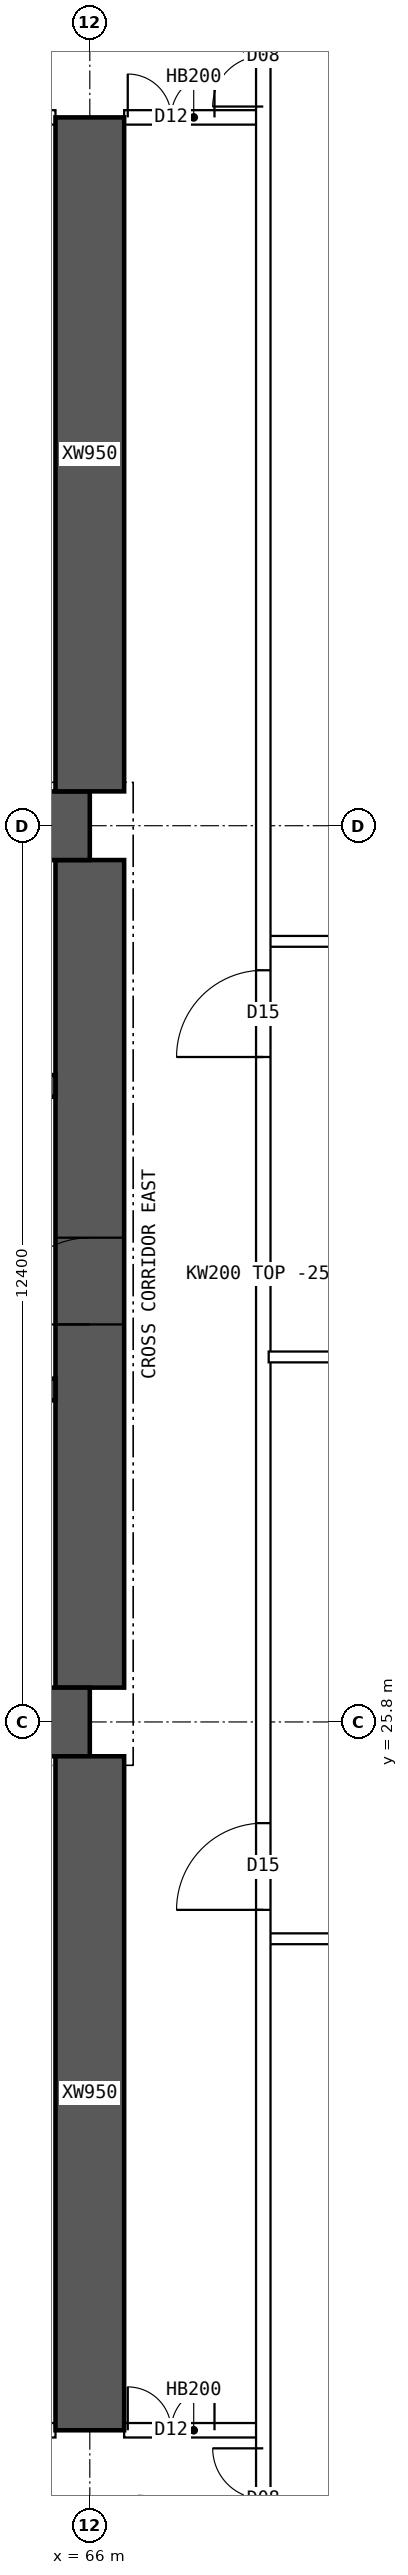
"""IFC4 building model, lengths in metres.
Left out: names, types, materials, properties, quantities, classifications, styles, units other than length and angle.
Written with IfcOpenShell. Run it as: python <this file> out.ifc"""

import sys

from ifc_helpers import new_model, si_unit, direction, frame, frame_2d, origin, place, context, subcontext, project, spatial, polyline, rectangle, outline, extrude, element, fill, save


model = new_model("IFC4")
c1 = context("Model", 3, precision=1e-05, world=origin(), true_north=direction((0.0, 1.0)))
c2 = subcontext(c1, "Body", "Model", "MODEL_VIEW")
j1 = project(units=[si_unit("LENGTHUNIT", "METRE"), si_unit("PLANEANGLEUNIT", "RADIAN")], contexts=[c1])
p1 = place(None, origin())
s1 = spatial("IfcSite", under=j1, at=p1, CompositionType="ELEMENT")
p2 = place(p1, origin())
s2 = spatial("IfcBuilding", under=s1, at=p2, CompositionType="ELEMENT")
p3 = place(p2, frame((0.0, 0.0, 76.15)))
s3 = spatial("IfcBuildingStorey", under=s2, at=p3, CompositionType="ELEMENT", Elevation=76.15)
for number, where, z_axis, x_axis in (
    (1, (18.0, 25.8, 0.0), (0.0, 0.0, 1.0), (1.0, 0.0, 0.0)),
    (2, (18.0, 38.2, 0.0), (0.0, 0.0, 1.0), (1.0, 0.0, 0.0)),
):
    element("IfcWall", number, at=place(p3, frame(where, z_axis=z_axis, x_axis=x_axis)), inside=s3, PredefinedType="SHEAR", context=c2, shape_type="SweptSolid", body=[
        extrude(rectangle(XDim=48.0, YDim=0.95, at=frame_2d((24.0, 0.0))), origin(), (0.0, 0.0, 1.0), 4.5),
    ])
p4 = place(p3, frame((66.0, 26.275, 0.0), z_axis=(0.0, 0.0, 1.0), x_axis=(0.0, 1.0, 0.0)))
e3 = element("IfcWall", 3, at=p4, inside=s3, PredefinedType="SHEAR", context=c2, shape_type="SweptSolid", body=[
    extrude(rectangle(XDim=11.45, YDim=0.95, at=frame_2d((5.725, 0.0))), origin(), (0.0, 0.0, 1.0), 4.5),
])
p5 = place(p4, frame((5.025, 0.0, 0.0)))
e4 = element("IfcOpeningElement", 4, at=p5, cuts=e3, PredefinedType="OPENING", context=c2, shape_type="SweptSolid", body=[
    extrude(rectangle(XDim=1.2, YDim=2.1, at=frame_2d((0.6, 1.05))), frame((0.0, 0.485, 0.0), z_axis=(0.0, -1.0, 0.0), x_axis=(1.0, 0.0, 0.0)), (0.0, 0.0, 1.0), 0.97),
])
p6 = place(p3, frame((18.475, 30.4, 0.0), z_axis=(0.0, 0.0, 1.0), x_axis=(1.0, 0.0, 0.0)))
e5 = element("IfcWall", 5, at=p6, inside=s3, PredefinedType="SHEAR", context=c2, shape_type="SweptSolid", body=[
    extrude(rectangle(XDim=47.05, YDim=0.3, at=frame_2d((23.525, 0.0))), origin(), (0.0, 0.0, 1.0), 4.5),
])
p7 = place(p6, frame((0.4, 0.0, 0.0)))
e6 = element("IfcOpeningElement", 6, at=p7, cuts=e5, PredefinedType="OPENING", context=c2, shape_type="SweptSolid", body=[
    extrude(rectangle(XDim=1.0, YDim=2.1, at=frame_2d((0.5, 1.05))), frame((0.0, 0.16, 0.0), z_axis=(0.0, -1.0, 0.0), x_axis=(1.0, 0.0, 0.0)), (0.0, 0.0, 1.0), 0.32),
])
p8 = place(p6, frame((45.65, 0.0, 0.0)))
e7 = element("IfcOpeningElement", 7, at=p8, cuts=e5, PredefinedType="OPENING", context=c2, shape_type="SweptSolid", body=[
    extrude(rectangle(XDim=1.0, YDim=2.1, at=frame_2d((0.5, 1.05))), frame((0.0, 0.16, 0.0), z_axis=(0.0, -1.0, 0.0), x_axis=(1.0, 0.0, 0.0)), (0.0, 0.0, 1.0), 0.32),
])
p9 = place(p6, frame((8.275, 0.0, 0.0)))
e8 = element("IfcOpeningElement", 8, at=p9, cuts=e5, PredefinedType="OPENING", context=c2, shape_type="SweptSolid", body=[
    extrude(rectangle(XDim=1.1, YDim=2.1, at=frame_2d((0.55, 1.05))), frame((0.0, 0.16, 0.0), z_axis=(0.0, -1.0, 0.0), x_axis=(1.0, 0.0, 0.0)), (0.0, 0.0, 1.0), 0.32),
])
p10 = place(p6, frame((10.875, 0.0, 0.0)))
e9 = element("IfcOpeningElement", 9, at=p10, cuts=e5, PredefinedType="OPENING", context=c2, shape_type="SweptSolid", body=[
    extrude(rectangle(XDim=1.1, YDim=2.1, at=frame_2d((0.55, 1.05))), frame((0.0, 0.16, 0.0), z_axis=(0.0, -1.0, 0.0), x_axis=(1.0, 0.0, 0.0)), (0.0, 0.0, 1.0), 0.32),
])
p11 = place(p6, frame((13.475, 0.0, 0.0)))
e10 = element("IfcOpeningElement", 10, at=p11, cuts=e5, PredefinedType="OPENING", context=c2, shape_type="SweptSolid", body=[
    extrude(rectangle(XDim=1.1, YDim=2.1, at=frame_2d((0.55, 1.05))), frame((0.0, 0.16, 0.0), z_axis=(0.0, -1.0, 0.0), x_axis=(1.0, 0.0, 0.0)), (0.0, 0.0, 1.0), 0.32),
])
p12 = place(p6, frame((16.075, 0.0, 0.0)))
e11 = element("IfcOpeningElement", 11, at=p12, cuts=e5, PredefinedType="OPENING", context=c2, shape_type="SweptSolid", body=[
    extrude(rectangle(XDim=1.1, YDim=2.1, at=frame_2d((0.55, 1.05))), frame((0.0, 0.16, 0.0), z_axis=(0.0, -1.0, 0.0), x_axis=(1.0, 0.0, 0.0)), (0.0, 0.0, 1.0), 0.32),
])
p13 = place(p6, frame((18.75, 0.0, 0.0)))
e12 = element("IfcOpeningElement", 12, at=p13, cuts=e5, PredefinedType="OPENING", context=c2, shape_type="SweptSolid", body=[
    extrude(rectangle(XDim=1.1, YDim=2.1, at=frame_2d((0.55, 1.05))), frame((0.0, 0.16, 0.0), z_axis=(0.0, -1.0, 0.0), x_axis=(1.0, 0.0, 0.0)), (0.0, 0.0, 1.0), 0.32),
])
p14 = place(p6, frame((30.142, 0.0, 0.0)))
e13 = element("IfcOpeningElement", 13, at=p14, cuts=e5, PredefinedType="OPENING", context=c2, shape_type="SweptSolid", body=[
    extrude(rectangle(XDim=1.1, YDim=2.1, at=frame_2d((0.55, 1.05))), frame((0.0, 0.16, 0.0), z_axis=(0.0, -1.0, 0.0), x_axis=(1.0, 0.0, 0.0)), (0.0, 0.0, 1.0), 0.32),
])
p15 = place(p6, frame((33.675, 0.0, 0.0)))
e14 = element("IfcOpeningElement", 14, at=p15, cuts=e5, PredefinedType="OPENING", context=c2, shape_type="SweptSolid", body=[
    extrude(rectangle(XDim=1.1, YDim=2.1, at=frame_2d((0.55, 1.05))), frame((0.0, 0.16, 0.0), z_axis=(0.0, -1.0, 0.0), x_axis=(1.0, 0.0, 0.0)), (0.0, 0.0, 1.0), 0.32),
])
p16 = place(p6, frame((37.208, 0.0, 0.0)))
e15 = element("IfcOpeningElement", 15, at=p16, cuts=e5, PredefinedType="OPENING", context=c2, shape_type="SweptSolid", body=[
    extrude(rectangle(XDim=1.1, YDim=2.1, at=frame_2d((0.55, 1.05))), frame((0.0, 0.16, 0.0), z_axis=(0.0, -1.0, 0.0), x_axis=(1.0, 0.0, 0.0)), (0.0, 0.0, 1.0), 0.32),
])
p17 = place(p3, frame((18.475, 34.6, 0.0), z_axis=(0.0, 0.0, 1.0), x_axis=(1.0, 0.0, 0.0)))
e16 = element("IfcWall", 16, at=p17, inside=s3, PredefinedType="SHEAR", context=c2, shape_type="SweptSolid", body=[
    extrude(rectangle(XDim=47.05, YDim=0.3, at=frame_2d((23.525, 0.0))), origin(), (0.0, 0.0, 1.0), 4.5),
])
p18 = place(p17, frame((0.9, 0.0, 0.0)))
e17 = element("IfcOpeningElement", 17, at=p18, cuts=e16, PredefinedType="OPENING", context=c2, shape_type="SweptSolid", body=[
    extrude(rectangle(XDim=1.1, YDim=2.1, at=frame_2d((0.55, 1.05))), frame((0.0, 0.16, 0.0), z_axis=(0.0, -1.0, 0.0), x_axis=(1.0, 0.0, 0.0)), (0.0, 0.0, 1.0), 0.32),
])
p19 = place(p17, frame((45.05, 0.0, 0.0)))
e18 = element("IfcOpeningElement", 18, at=p19, cuts=e16, PredefinedType="OPENING", context=c2, shape_type="SweptSolid", body=[
    extrude(rectangle(XDim=1.1, YDim=2.1, at=frame_2d((0.55, 1.05))), frame((0.0, 0.16, 0.0), z_axis=(0.0, -1.0, 0.0), x_axis=(1.0, 0.0, 0.0)), (0.0, 0.0, 1.0), 0.32),
])
p20 = place(p17, frame((4.125, 0.0, 0.0)))
e19 = element("IfcOpeningElement", 19, at=p20, cuts=e16, PredefinedType="OPENING", context=c2, shape_type="SweptSolid", body=[
    extrude(rectangle(XDim=0.9, YDim=2.1, at=frame_2d((0.45, 1.05))), frame((0.0, 0.16, 0.0), z_axis=(0.0, -1.0, 0.0), x_axis=(1.0, 0.0, 0.0)), (0.0, 0.0, 1.0), 0.32),
])
p21 = place(p17, frame((42.025, 0.0, 0.0)))
e20 = element("IfcOpeningElement", 20, at=p21, cuts=e16, PredefinedType="OPENING", context=c2, shape_type="SweptSolid", body=[
    extrude(rectangle(XDim=0.9, YDim=2.1, at=frame_2d((0.45, 1.05))), frame((0.0, 0.16, 0.0), z_axis=(0.0, -1.0, 0.0), x_axis=(1.0, 0.0, 0.0)), (0.0, 0.0, 1.0), 0.32),
])
p22 = place(p17, frame((8.9, 0.0, 0.0)))
e21 = element("IfcOpeningElement", 21, at=p22, cuts=e16, PredefinedType="OPENING", context=c2, shape_type="SweptSolid", body=[
    extrude(rectangle(XDim=0.9, YDim=2.1, at=frame_2d((0.45, 1.05))), frame((0.0, 0.16, 0.0), z_axis=(0.0, -1.0, 0.0), x_axis=(1.0, 0.0, 0.0)), (0.0, 0.0, 1.0), 0.32),
])
p23 = place(p17, frame((12.874, 0.0, 0.0)))
e22 = element("IfcOpeningElement", 22, at=p23, cuts=e16, PredefinedType="OPENING", context=c2, shape_type="SweptSolid", body=[
    extrude(rectangle(XDim=0.9, YDim=2.1, at=frame_2d((0.45, 1.05))), frame((0.0, 0.16, 0.0), z_axis=(0.0, -1.0, 0.0), x_axis=(1.0, 0.0, 0.0)), (0.0, 0.0, 1.0), 0.32),
])
p24 = place(p17, frame((16.521, 0.0, 0.0)))
e23 = element("IfcOpeningElement", 23, at=p24, cuts=e16, PredefinedType="OPENING", context=c2, shape_type="SweptSolid", body=[
    extrude(rectangle(XDim=0.9, YDim=2.1, at=frame_2d((0.45, 1.05))), frame((0.0, 0.16, 0.0), z_axis=(0.0, -1.0, 0.0), x_axis=(1.0, 0.0, 0.0)), (0.0, 0.0, 1.0), 0.32),
])
p25 = place(p17, frame((20.28, 0.0, 0.0)))
e24 = element("IfcOpeningElement", 24, at=p25, cuts=e16, PredefinedType="OPENING", context=c2, shape_type="SweptSolid", body=[
    extrude(rectangle(XDim=0.9, YDim=2.1, at=frame_2d((0.45, 1.05))), frame((0.0, 0.16, 0.0), z_axis=(0.0, -1.0, 0.0), x_axis=(1.0, 0.0, 0.0)), (0.0, 0.0, 1.0), 0.32),
])
p26 = place(p17, frame((24.686, 0.0, 0.0)))
e25 = element("IfcOpeningElement", 25, at=p26, cuts=e16, PredefinedType="OPENING", context=c2, shape_type="SweptSolid", body=[
    extrude(rectangle(XDim=0.9, YDim=2.1, at=frame_2d((0.45, 1.05))), frame((0.0, 0.16, 0.0), z_axis=(0.0, -1.0, 0.0), x_axis=(1.0, 0.0, 0.0)), (0.0, 0.0, 1.0), 0.32),
])
p27 = place(p17, frame((27.483, 0.0, 0.0)))
e26 = element("IfcOpeningElement", 26, at=p27, cuts=e16, PredefinedType="OPENING", context=c2, shape_type="SweptSolid", body=[
    extrude(rectangle(XDim=0.9, YDim=2.1, at=frame_2d((0.45, 1.05))), frame((0.0, 0.16, 0.0), z_axis=(0.0, -1.0, 0.0), x_axis=(1.0, 0.0, 0.0)), (0.0, 0.0, 1.0), 0.32),
])
p28 = place(p17, frame((29.45, 0.0, 0.0)))
e27 = element("IfcOpeningElement", 27, at=p28, cuts=e16, PredefinedType="OPENING", context=c2, shape_type="SweptSolid", body=[
    extrude(rectangle(XDim=0.9, YDim=2.1, at=frame_2d((0.45, 1.05))), frame((0.0, 0.16, 0.0), z_axis=(0.0, -1.0, 0.0), x_axis=(1.0, 0.0, 0.0)), (0.0, 0.0, 1.0), 0.32),
])
p29 = place(p17, frame((31.882, 0.0, 0.0)))
e28 = element("IfcOpeningElement", 28, at=p29, cuts=e16, PredefinedType="OPENING", context=c2, shape_type="SweptSolid", body=[
    extrude(rectangle(XDim=0.9, YDim=2.1, at=frame_2d((0.45, 1.05))), frame((0.0, 0.16, 0.0), z_axis=(0.0, -1.0, 0.0), x_axis=(1.0, 0.0, 0.0)), (0.0, 0.0, 1.0), 0.32),
])
p30 = place(p17, frame((34.617, 0.0, 0.0)))
e29 = element("IfcOpeningElement", 29, at=p30, cuts=e16, PredefinedType="OPENING", context=c2, shape_type="SweptSolid", body=[
    extrude(rectangle(XDim=0.9, YDim=2.1, at=frame_2d((0.45, 1.05))), frame((0.0, 0.16, 0.0), z_axis=(0.0, -1.0, 0.0), x_axis=(1.0, 0.0, 0.0)), (0.0, 0.0, 1.0), 0.32),
])
p31 = place(p17, frame((37.656, 0.0, 0.0)))
e30 = element("IfcOpeningElement", 30, at=p31, cuts=e16, PredefinedType="OPENING", context=c2, shape_type="SweptSolid", body=[
    extrude(rectangle(XDim=0.9, YDim=2.1, at=frame_2d((0.45, 1.05))), frame((0.0, 0.16, 0.0), z_axis=(0.0, -1.0, 0.0), x_axis=(1.0, 0.0, 0.0)), (0.0, 0.0, 1.0), 0.32),
])
for number, where, z_axis, x_axis in (
    (31, (66.0, 16.0, 0.0), (0.0, 0.0, 1.0), (0.0, 1.0, 0.0)),
    (32, (66.0, 38.675, 0.0), (0.0, 0.0, 1.0), (0.0, 1.0, 0.0)),
):
    element("IfcWall", number, at=place(p3, frame(where, z_axis=z_axis, x_axis=x_axis)), inside=s3, PredefinedType="SHEAR", context=c2, shape_type="SweptSolid", body=[
        extrude(rectangle(XDim=9.325, YDim=0.95, at=frame_2d((4.663, 0.0))), origin(), (0.0, 0.0, 1.0), 4.5),
    ])
p32 = place(p3, frame((60.475, 16.0, 0.0), z_axis=(0.0, 0.0, 1.0), x_axis=(1.0, 0.0, 0.0)))
e33 = element("IfcWall", 33, at=p32, inside=s3, PredefinedType="SOLIDWALL", context=c2, shape_type="SweptSolid", body=[
    extrude(rectangle(XDim=5.05, YDim=0.2, at=frame_2d((2.525, 0.0))), origin(), (0.0, 0.0, 1.0), 4.25),
])
p33 = place(p32, frame((0.15, 0.0, 0.0)))
e34 = element("IfcOpeningElement", 34, at=p33, cuts=e33, PredefinedType="OPENING", context=c2, shape_type="SweptSolid", body=[
    extrude(rectangle(XDim=0.9, YDim=2.1, at=frame_2d((0.45, 1.05))), frame((0.0, 0.11, 0.0), z_axis=(0.0, -1.0, 0.0), x_axis=(1.0, 0.0, 0.0)), (0.0, 0.0, 1.0), 0.22),
])
p34 = place(p32, frame((2.355, 0.0, 0.0)))
e35 = element("IfcOpeningElement", 35, at=p34, cuts=e33, PredefinedType="OPENING", context=c2, shape_type="SweptSolid", body=[
    extrude(rectangle(XDim=0.9, YDim=2.1, at=frame_2d((0.45, 1.05))), frame((0.0, 0.11, 0.0), z_axis=(0.0, -1.0, 0.0), x_axis=(1.0, 0.0, 0.0)), (0.0, 0.0, 1.0), 0.22),
])
p35 = place(p3, frame((66.475, 16.0, 0.0), z_axis=(0.0, 0.0, 1.0), x_axis=(1.0, 0.0, 0.0)))
e36 = element("IfcWall", 36, at=p35, inside=s3, PredefinedType="SOLIDWALL", context=c2, shape_type="SweptSolid", body=[
    extrude(rectangle(XDim=1.925, YDim=0.2, at=frame_2d((0.962, 0.0))), origin(), (0.0, 0.0, 1.0), 4.25),
])
p36 = place(p35, frame((0.05, 0.0, 0.0)))
e37 = element("IfcOpeningElement", 37, at=p36, cuts=e36, PredefinedType="OPENING", context=c2, shape_type="SweptSolid", body=[
    extrude(rectangle(XDim=1.2, YDim=2.1, at=frame_2d((0.6, 1.05))), frame((0.0, 0.11, 0.0), z_axis=(0.0, -1.0, 0.0), x_axis=(1.0, 0.0, 0.0)), (0.0, 0.0, 1.0), 0.22),
])
p37 = place(p3, frame((60.475, 48.0, 0.0), z_axis=(0.0, 0.0, 1.0), x_axis=(1.0, 0.0, 0.0)))
e38 = element("IfcWall", 38, at=p37, inside=s3, PredefinedType="SOLIDWALL", context=c2, shape_type="SweptSolid", body=[
    extrude(rectangle(XDim=5.05, YDim=0.2, at=frame_2d((2.525, 0.0))), origin(), (0.0, 0.0, 1.0), 4.25),
])
p38 = place(p37, frame((0.15, 0.0, 0.0)))
e39 = element("IfcOpeningElement", 39, at=p38, cuts=e38, PredefinedType="OPENING", context=c2, shape_type="SweptSolid", body=[
    extrude(rectangle(XDim=0.9, YDim=2.1, at=frame_2d((0.45, 1.05))), frame((0.0, 0.11, 0.0), z_axis=(0.0, -1.0, 0.0), x_axis=(1.0, 0.0, 0.0)), (0.0, 0.0, 1.0), 0.22),
])
p39 = place(p37, frame((3.165, 0.0, 0.0)))
e40 = element("IfcOpeningElement", 40, at=p39, cuts=e38, PredefinedType="OPENING", context=c2, shape_type="SweptSolid", body=[
    extrude(rectangle(XDim=0.9, YDim=2.1, at=frame_2d((0.45, 1.05))), frame((0.0, 0.11, 0.0), z_axis=(0.0, -1.0, 0.0), x_axis=(1.0, 0.0, 0.0)), (0.0, 0.0, 1.0), 0.22),
])
p40 = place(p3, frame((66.475, 48.0, 0.0), z_axis=(0.0, 0.0, 1.0), x_axis=(1.0, 0.0, 0.0)))
e41 = element("IfcWall", 41, at=p40, inside=s3, PredefinedType="SOLIDWALL", context=c2, shape_type="SweptSolid", body=[
    extrude(rectangle(XDim=1.925, YDim=0.2, at=frame_2d((0.962, 0.0))), origin(), (0.0, 0.0, 1.0), 4.25),
])
p41 = place(p40, frame((0.05, 0.0, 0.0)))
e42 = element("IfcOpeningElement", 42, at=p41, cuts=e41, PredefinedType="OPENING", context=c2, shape_type="SweptSolid", body=[
    extrude(rectangle(XDim=1.2, YDim=2.1, at=frame_2d((0.6, 1.05))), frame((0.0, 0.11, 0.0), z_axis=(0.0, -1.0, 0.0), x_axis=(1.0, 0.0, 0.0)), (0.0, 0.0, 1.0), 0.22),
])
p42 = place(p3, frame((68.475, 30.85, 0.0), z_axis=(0.0, 0.0, 1.0), x_axis=(1.0, 0.0, 0.0)))
e43 = element("IfcWall", 43, at=p42, inside=s3, PredefinedType="PARTITIONING", context=c2, shape_type="SweptSolid", body=[
    extrude(outline(polyline([(0.0, 0.0), (6.82, 0.0), (6.82, 4.25), (3.827, 4.25), (3.825, 3.8), (3.227, 3.8), (3.225, 4.25), (0.0, 4.25), (0.0, 0.0)])), frame((0.0, 0.075, 0.0), z_axis=(0.0, -1.0, 0.0), x_axis=(1.0, 0.0, 0.0)), (0.0, 0.0, 1.0), 0.15),
])
p43 = place(p3, frame((68.4, 9.405, 0.0), z_axis=(0.0, 0.0, 1.0), x_axis=(0.0, 1.0, 0.0)))
e44 = element("IfcWall", 44, at=p43, inside=s3, PredefinedType="SOLIDWALL", context=c2, shape_type="SweptSolid", body=[
    extrude(rectangle(XDim=45.189, YDim=0.2, at=frame_2d((22.595, 0.0))), origin(), (0.0, 0.0, 1.0), 4.25),
])
p44 = place(p43, frame((13.795, 0.0, 0.0)))
e45 = element("IfcOpeningElement", 45, at=p44, cuts=e44, PredefinedType="OPENING", context=c2, shape_type="SweptSolid", body=[
    extrude(rectangle(XDim=1.2, YDim=2.1, at=frame_2d((0.6, 1.05))), frame((0.0, 0.11, 0.0), z_axis=(0.0, -1.0, 0.0), x_axis=(1.0, 0.0, 0.0)), (0.0, 0.0, 1.0), 0.22),
])
p45 = place(p43, frame((25.595, 0.0, 0.0)))
e46 = element("IfcOpeningElement", 46, at=p45, cuts=e44, PredefinedType="OPENING", context=c2, shape_type="SweptSolid", body=[
    extrude(rectangle(XDim=1.2, YDim=2.1, at=frame_2d((0.6, 1.05))), frame((0.0, 0.11, 0.0), z_axis=(0.0, -1.0, 0.0), x_axis=(1.0, 0.0, 0.0)), (0.0, 0.0, 1.0), 0.22),
])
p46 = place(p43, frame((4.945, 0.0, 0.0)))
e47 = element("IfcOpeningElement", 47, at=p46, cuts=e44, PredefinedType="OPENING", context=c2, shape_type="SweptSolid", body=[
    extrude(rectangle(XDim=1.4, YDim=2.1, at=frame_2d((0.7, 1.05))), frame((0.0, 0.11, 0.0), z_axis=(0.0, -1.0, 0.0), x_axis=(1.0, 0.0, 0.0)), (0.0, 0.0, 1.0), 0.22),
])
p47 = place(p43, frame((38.745, 0.0, 0.0)))
e48 = element("IfcOpeningElement", 48, at=p47, cuts=e44, PredefinedType="OPENING", context=c2, shape_type="SweptSolid", body=[
    extrude(rectangle(XDim=1.4, YDim=2.1, at=frame_2d((0.7, 1.05))), frame((0.0, 0.11, 0.0), z_axis=(0.0, -1.0, 0.0), x_axis=(1.0, 0.0, 0.0)), (0.0, 0.0, 1.0), 0.22),
])
p48 = place(p3, frame((68.475, 22.8, 0.0), z_axis=(0.0, 0.0, 1.0), x_axis=(1.0, 0.0, 0.0)))
e49 = element("IfcWall", 49, at=p48, inside=s3, PredefinedType="PARTITIONING", context=c2, shape_type="SweptSolid", body=[
    extrude(outline(polyline([(0.0, 0.0), (6.82, 0.0), (6.82, 4.25), (3.827, 4.25), (3.825, 3.8), (3.227, 3.8), (3.225, 4.25), (0.0, 4.25), (0.0, 0.0)])), frame((0.0, 0.075, 0.0), z_axis=(0.0, -1.0, 0.0), x_axis=(1.0, 0.0, 0.0)), (0.0, 0.0, 1.0), 0.15),
])
p49 = place(p3, frame((68.475, 36.6, 0.0), z_axis=(0.0, 0.0, 1.0), x_axis=(1.0, 0.0, 0.0)))
e50 = element("IfcWall", 50, at=p49, inside=s3, PredefinedType="PARTITIONING", context=c2, shape_type="SweptSolid", body=[
    extrude(rectangle(XDim=6.82, YDim=0.15, at=frame_2d((3.41, 0.0))), origin(), (0.0, 0.0, 1.0), 4.25),
])
p50 = place(p5, origin())
e51 = element("IfcDoor", 51, at=p50, inside=s3, OperationType="SINGLE_SWING_LEFT", PredefinedType="DOOR", context=c2, shape_type="SweptSolid", body=[
    extrude(rectangle(XDim=1.2, YDim=2.1, at=frame_2d((0.6, 1.05))), frame((0.0, 0.025, 0.0), z_axis=(0.0, -1.0, 0.0), x_axis=(1.0, 0.0, 0.0)), (0.0, 0.0, 1.0), 0.05),
])
fill(e4, e51)
p51 = place(p36, origin())
e52 = element("IfcDoor", 52, at=p51, inside=s3, OperationType="DOUBLE_DOOR_SINGLE_SWING", PredefinedType="DOOR", context=c2, shape_type="SweptSolid", body=[
    extrude(rectangle(XDim=1.2, YDim=2.1, at=frame_2d((0.6, 1.05))), frame((0.0, 0.025, 0.0), z_axis=(0.0, -1.0, 0.0), x_axis=(1.0, 0.0, 0.0)), (0.0, 0.0, 1.0), 0.05),
])
fill(e37, e52)
p52 = place(p41, origin())
e53 = element("IfcDoor", 53, at=p52, inside=s3, OperationType="DOUBLE_DOOR_SINGLE_SWING", PredefinedType="DOOR", context=c2, shape_type="SweptSolid", body=[
    extrude(rectangle(XDim=1.2, YDim=2.1, at=frame_2d((0.6, 1.05))), frame((0.0, 0.025, 0.0), z_axis=(0.0, -1.0, 0.0), x_axis=(1.0, 0.0, 0.0)), (0.0, 0.0, 1.0), 0.05),
])
fill(e42, e53)
p53 = place(p44, origin())
e54 = element("IfcDoor", 54, at=p53, inside=s3, OperationType="SINGLE_SWING_LEFT", PredefinedType="DOOR", context=c2, shape_type="SweptSolid", body=[
    extrude(rectangle(XDim=1.2, YDim=2.1, at=frame_2d((0.6, 1.05))), frame((0.0, 0.025, 0.0), z_axis=(0.0, -1.0, 0.0), x_axis=(1.0, 0.0, 0.0)), (0.0, 0.0, 1.0), 0.05),
])
fill(e45, e54)
p54 = place(p45, origin())
e55 = element("IfcDoor", 55, at=p54, inside=s3, OperationType="SINGLE_SWING_LEFT", PredefinedType="DOOR", context=c2, shape_type="SweptSolid", body=[
    extrude(rectangle(XDim=1.2, YDim=2.1, at=frame_2d((0.6, 1.05))), frame((0.0, 0.025, 0.0), z_axis=(0.0, -1.0, 0.0), x_axis=(1.0, 0.0, 0.0)), (0.0, 0.0, 1.0), 0.05),
])
fill(e46, e55)
p55 = place(p46, origin())
e56 = element("IfcDoor", 56, at=p55, inside=s3, OperationType="DOUBLE_DOOR_SINGLE_SWING", PredefinedType="DOOR", context=c2, shape_type="SweptSolid", body=[
    extrude(rectangle(XDim=1.4, YDim=2.1, at=frame_2d((0.7, 1.05))), frame((0.0, 0.025, 0.0), z_axis=(0.0, -1.0, 0.0), x_axis=(1.0, 0.0, 0.0)), (0.0, 0.0, 1.0), 0.05),
])
fill(e47, e56)
p56 = place(p47, origin())
e57 = element("IfcDoor", 57, at=p56, inside=s3, OperationType="DOUBLE_DOOR_SINGLE_SWING", PredefinedType="DOOR", context=c2, shape_type="SweptSolid", body=[
    extrude(rectangle(XDim=1.4, YDim=2.1, at=frame_2d((0.7, 1.05))), frame((0.0, 0.025, 0.0), z_axis=(0.0, -1.0, 0.0), x_axis=(1.0, 0.0, 0.0)), (0.0, 0.0, 1.0), 0.05),
])
fill(e48, e57)
save(model, sys.argv[1])
